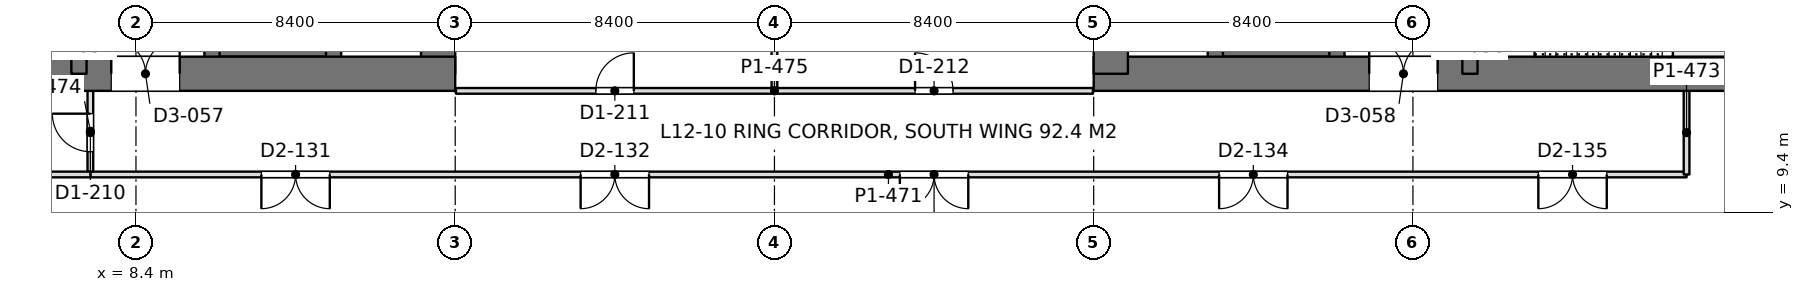
"""IFC4 building model, lengths in metres.
Left out: names, types, materials, properties, quantities, classifications, styles, units other than length and angle.
Written with IfcOpenShell. Run it as: python <this file> out.ifc"""

import sys

from ifc_helpers import new_model, si_unit, direction, frame, frame_2d, origin, place, context, subcontext, project, spatial, rectangle, extrude, element, fill, save


model = new_model("IFC4")
c1 = context("Model", 3, precision=1e-05, world=origin(), true_north=direction((0.0, 1.0)))
c2 = subcontext(c1, "Body", "Model", "MODEL_VIEW")
j1 = project(units=[si_unit("LENGTHUNIT", "METRE"), si_unit("PLANEANGLEUNIT", "RADIAN")], contexts=[c1])
p1 = place(None, origin())
s1 = spatial("IfcSite", under=j1, at=p1, CompositionType="ELEMENT")
p2 = place(p1, origin())
s2 = spatial("IfcBuilding", under=s1, at=p2, CompositionType="ELEMENT")
p3 = place(p2, frame((0.0, 0.0, 54.9)))
s3 = spatial("IfcBuildingStorey", under=s2, at=p3, CompositionType="ELEMENT", Elevation=54.9)
p4 = place(p3, frame((-1.2, 13.05, 0.0), z_axis=(0.0, 0.0, 1.0), x_axis=(1.0, 0.0, 0.0)))
e1 = element("IfcWall", 1, at=p4, inside=s3, PredefinedType="SHEAR", context=c2, shape_type="SweptSolid", body=[
    extrude(rectangle(XDim=18.0, YDim=0.9, at=frame_2d((9.0, 0.0))), origin(), (0.0, 0.0, 1.0), 4.5),
])
p5 = place(p4, frame((8.95, 0.0, 0.0)))
e2 = element("IfcOpeningElement", 2, at=p5, cuts=e1, PredefinedType="OPENING", context=c2, shape_type="SweptSolid", body=[
    extrude(rectangle(XDim=1.8, YDim=2.4, at=frame_2d((0.9, 1.2))), frame((0.0, 0.46, 0.0), z_axis=(0.0, -1.0, 0.0), x_axis=(1.0, 0.0, 0.0)), (0.0, 0.0, 1.0), 0.92),
])
p6 = place(p3, frame((16.35, 13.05, 0.0), z_axis=(0.0, 0.0, 1.0), x_axis=(0.0, 1.0, 0.0)))
e3 = element("IfcWall", 3, at=p6, inside=s3, PredefinedType="SHEAR", context=c2, shape_type="SweptSolid", body=[
    extrude(rectangle(XDim=24.3, YDim=0.9, at=frame_2d((12.15, 0.0))), origin(), (0.0, 0.0, 1.0), 4.5),
])
p7 = place(p3, frame((6.9, 13.05, 0.0), z_axis=(0.0, 0.0, 1.0), x_axis=(0.0, 1.0, 0.0)))
e4 = element("IfcWall", 4, at=p7, inside=s3, PredefinedType="SHEAR", context=c2, shape_type="SweptSolid", body=[
    extrude(rectangle(XDim=24.3, YDim=0.4, at=frame_2d((12.15, 0.0))), origin(), (0.0, 0.0, 1.0), 4.5),
])
p8 = place(p7, frame((1.3, 0.0, 0.0)))
e5 = element("IfcOpeningElement", 5, at=p8, cuts=e4, PredefinedType="OPENING", context=c2, shape_type="SweptSolid", body=[
    extrude(rectangle(XDim=1.0, YDim=2.2, at=frame_2d((0.5, 1.1))), frame((0.0, 0.21, 0.0), z_axis=(0.0, -1.0, 0.0), x_axis=(1.0, 0.0, 0.0)), (0.0, 0.0, 1.0), 0.42),
])
p9 = place(p7, frame((22.0, 0.0, 0.0)))
e6 = element("IfcOpeningElement", 6, at=p9, cuts=e4, PredefinedType="OPENING", context=c2, shape_type="SweptSolid", body=[
    extrude(rectangle(XDim=1.0, YDim=2.2, at=frame_2d((0.5, 1.1))), frame((0.0, 0.21, 0.0), z_axis=(0.0, -1.0, 0.0), x_axis=(1.0, 0.0, 0.0)), (0.0, 0.0, 1.0), 0.42),
])
p10 = place(p7, frame((5.55, 0.0, 0.0)))
e7 = element("IfcOpeningElement", 7, at=p10, cuts=e4, PredefinedType="OPENING", context=c2, shape_type="SweptSolid", body=[
    extrude(rectangle(XDim=1.0, YDim=2.2, at=frame_2d((0.5, 1.1))), frame((0.0, 0.21, 0.0), z_axis=(0.0, -1.0, 0.0), x_axis=(1.0, 0.0, 0.0)), (0.0, 0.0, 1.0), 0.42),
])
p11 = place(p7, frame((9.55, 0.0, 0.0)))
e8 = element("IfcOpeningElement", 8, at=p11, cuts=e4, PredefinedType="OPENING", context=c2, shape_type="SweptSolid", body=[
    extrude(rectangle(XDim=1.0, YDim=2.2, at=frame_2d((0.5, 1.1))), frame((0.0, 0.21, 0.0), z_axis=(0.0, -1.0, 0.0), x_axis=(1.0, 0.0, 0.0)), (0.0, 0.0, 1.0), 0.42),
])
p12 = place(p7, frame((12.8, 0.0, 0.0)))
e9 = element("IfcOpeningElement", 9, at=p12, cuts=e4, PredefinedType="OPENING", context=c2, shape_type="SweptSolid", body=[
    extrude(rectangle(XDim=1.1, YDim=2.2, at=frame_2d((0.55, 1.1))), frame((0.0, 0.21, 0.0), z_axis=(0.0, -1.0, 0.0), x_axis=(1.0, 0.0, 0.0)), (0.0, 0.0, 1.0), 0.42),
])
p13 = place(p7, frame((15.538, 0.0, 0.0)))
e10 = element("IfcOpeningElement", 10, at=p13, cuts=e4, PredefinedType="OPENING", context=c2, shape_type="SweptSolid", body=[
    extrude(rectangle(XDim=1.1, YDim=2.2, at=frame_2d((0.55, 1.1))), frame((0.0, 0.21, 0.0), z_axis=(0.0, -1.0, 0.0), x_axis=(1.0, 0.0, 0.0)), (0.0, 0.0, 1.0), 0.42),
])
p14 = place(p7, frame((18.262, 0.0, 0.0)))
e11 = element("IfcOpeningElement", 11, at=p14, cuts=e4, PredefinedType="OPENING", context=c2, shape_type="SweptSolid", body=[
    extrude(rectangle(XDim=1.1, YDim=2.2, at=frame_2d((0.55, 1.1))), frame((0.0, 0.21, 0.0), z_axis=(0.0, -1.0, 0.0), x_axis=(1.0, 0.0, 0.0)), (0.0, 0.0, 1.0), 0.42),
])
p15 = place(p3, frame((10.4, 13.05, 0.0), z_axis=(0.0, 0.0, 1.0), x_axis=(0.0, 1.0, 0.0)))
e12 = element("IfcWall", 12, at=p15, inside=s3, PredefinedType="SHEAR", context=c2, shape_type="SweptSolid", body=[
    extrude(rectangle(XDim=24.3, YDim=0.4, at=frame_2d((12.15, 0.0))), origin(), (0.0, 0.0, 1.0), 4.5),
])
p16 = place(p15, frame((1.5, 0.0, 0.0)))
e13 = element("IfcOpeningElement", 13, at=p16, cuts=e12, PredefinedType="OPENING", context=c2, shape_type="SweptSolid", body=[
    extrude(rectangle(XDim=1.1, YDim=2.2, at=frame_2d((0.55, 1.1))), frame((0.0, 0.21, 0.0), z_axis=(0.0, -1.0, 0.0), x_axis=(1.0, 0.0, 0.0)), (0.0, 0.0, 1.0), 0.42),
])
p17 = place(p15, frame((4.35, 0.0, 0.0)))
e14 = element("IfcOpeningElement", 14, at=p17, cuts=e12, PredefinedType="OPENING", context=c2, shape_type="SweptSolid", body=[
    extrude(rectangle(XDim=1.1, YDim=2.2, at=frame_2d((0.55, 1.1))), frame((0.0, 0.21, 0.0), z_axis=(0.0, -1.0, 0.0), x_axis=(1.0, 0.0, 0.0)), (0.0, 0.0, 1.0), 0.42),
])
p18 = place(p15, frame((7.2, 0.0, 0.0)))
e15 = element("IfcOpeningElement", 15, at=p18, cuts=e12, PredefinedType="OPENING", context=c2, shape_type="SweptSolid", body=[
    extrude(rectangle(XDim=1.1, YDim=2.2, at=frame_2d((0.55, 1.1))), frame((0.0, 0.21, 0.0), z_axis=(0.0, -1.0, 0.0), x_axis=(1.0, 0.0, 0.0)), (0.0, 0.0, 1.0), 0.42),
])
p19 = place(p15, frame((21.45, 0.0, 0.0)))
e16 = element("IfcOpeningElement", 16, at=p19, cuts=e12, PredefinedType="OPENING", context=c2, shape_type="SweptSolid", body=[
    extrude(rectangle(XDim=1.1, YDim=2.2, at=frame_2d((0.55, 1.1))), frame((0.0, 0.21, 0.0), z_axis=(0.0, -1.0, 0.0), x_axis=(1.0, 0.0, 0.0)), (0.0, 0.0, 1.0), 0.42),
])
p20 = place(p3, frame((13.6, 13.05, 0.0), z_axis=(0.0, 0.0, 1.0), x_axis=(0.0, 1.0, 0.0)))
e17 = element("IfcWall", 17, at=p20, inside=s3, PredefinedType="SHEAR", context=c2, shape_type="SweptSolid", body=[
    extrude(rectangle(XDim=24.3, YDim=0.4, at=frame_2d((12.15, 0.0))), origin(), (0.0, 0.0, 1.0), 4.5),
])
p21 = place(p3, frame((10.4, 13.65, 0.0), z_axis=(0.0, 0.0, 1.0), x_axis=(1.0, 0.0, 0.0)))
e18 = element("IfcWall", 18, at=p21, inside=s3, PredefinedType="SHEAR", context=c2, shape_type="SweptSolid", body=[
    extrude(rectangle(XDim=3.2, YDim=0.3, at=frame_2d((1.6, 0.0))), origin(), (0.0, 0.0, 1.0), 4.5),
])
p22 = place(p3, frame((33.6, 13.05, 0.0), z_axis=(0.0, 0.0, 1.0), x_axis=(1.0, 0.0, 0.0)))
e19 = element("IfcWall", 19, at=p22, inside=s3, PredefinedType="SHEAR", context=c2, shape_type="SweptSolid", body=[
    extrude(rectangle(XDim=18.0, YDim=0.9, at=frame_2d((9.0, 0.0))), origin(), (0.0, 0.0, 1.0), 4.5),
])
p23 = place(p22, frame((7.25, 0.0, 0.0)))
e20 = element("IfcOpeningElement", 20, at=p23, cuts=e19, PredefinedType="OPENING", context=c2, shape_type="SweptSolid", body=[
    extrude(rectangle(XDim=1.8, YDim=2.4, at=frame_2d((0.9, 1.2))), frame((0.0, 0.46, 0.0), z_axis=(0.0, -1.0, 0.0), x_axis=(1.0, 0.0, 0.0)), (0.0, 0.0, 1.0), 0.92),
])
p24 = place(p3, frame((34.05, 13.05, 0.0), z_axis=(0.0, 0.0, 1.0), x_axis=(0.0, 1.0, 0.0)))
e21 = element("IfcWall", 21, at=p24, inside=s3, PredefinedType="SHEAR", context=c2, shape_type="SweptSolid", body=[
    extrude(rectangle(XDim=24.3, YDim=0.9, at=frame_2d((12.15, 0.0))), origin(), (0.0, 0.0, 1.0), 4.5),
])
p25 = place(p3, frame((43.5, 13.05, 0.0), z_axis=(0.0, 0.0, 1.0), x_axis=(0.0, 1.0, 0.0)))
e22 = element("IfcWall", 22, at=p25, inside=s3, PredefinedType="SHEAR", context=c2, shape_type="SweptSolid", body=[
    extrude(rectangle(XDim=24.3, YDim=0.4, at=frame_2d((12.15, 0.0))), origin(), (0.0, 0.0, 1.0), 4.5),
])
p26 = place(p25, frame((1.3, 0.0, 0.0)))
e23 = element("IfcOpeningElement", 23, at=p26, cuts=e22, PredefinedType="OPENING", context=c2, shape_type="SweptSolid", body=[
    extrude(rectangle(XDim=1.0, YDim=2.2, at=frame_2d((0.5, 1.1))), frame((0.0, 0.21, 0.0), z_axis=(0.0, -1.0, 0.0), x_axis=(1.0, 0.0, 0.0)), (0.0, 0.0, 1.0), 0.42),
])
p27 = place(p25, frame((22.0, 0.0, 0.0)))
e24 = element("IfcOpeningElement", 24, at=p27, cuts=e22, PredefinedType="OPENING", context=c2, shape_type="SweptSolid", body=[
    extrude(rectangle(XDim=1.0, YDim=2.2, at=frame_2d((0.5, 1.1))), frame((0.0, 0.21, 0.0), z_axis=(0.0, -1.0, 0.0), x_axis=(1.0, 0.0, 0.0)), (0.0, 0.0, 1.0), 0.42),
])
p28 = place(p25, frame((5.55, 0.0, 0.0)))
e25 = element("IfcOpeningElement", 25, at=p28, cuts=e22, PredefinedType="OPENING", context=c2, shape_type="SweptSolid", body=[
    extrude(rectangle(XDim=1.0, YDim=2.2, at=frame_2d((0.5, 1.1))), frame((0.0, 0.21, 0.0), z_axis=(0.0, -1.0, 0.0), x_axis=(1.0, 0.0, 0.0)), (0.0, 0.0, 1.0), 0.42),
])
p29 = place(p25, frame((9.55, 0.0, 0.0)))
e26 = element("IfcOpeningElement", 26, at=p29, cuts=e22, PredefinedType="OPENING", context=c2, shape_type="SweptSolid", body=[
    extrude(rectangle(XDim=1.0, YDim=2.2, at=frame_2d((0.5, 1.1))), frame((0.0, 0.21, 0.0), z_axis=(0.0, -1.0, 0.0), x_axis=(1.0, 0.0, 0.0)), (0.0, 0.0, 1.0), 0.42),
])
p30 = place(p25, frame((12.8, 0.0, 0.0)))
e27 = element("IfcOpeningElement", 27, at=p30, cuts=e22, PredefinedType="OPENING", context=c2, shape_type="SweptSolid", body=[
    extrude(rectangle(XDim=1.1, YDim=2.2, at=frame_2d((0.55, 1.1))), frame((0.0, 0.21, 0.0), z_axis=(0.0, -1.0, 0.0), x_axis=(1.0, 0.0, 0.0)), (0.0, 0.0, 1.0), 0.42),
])
p31 = place(p25, frame((15.538, 0.0, 0.0)))
e28 = element("IfcOpeningElement", 28, at=p31, cuts=e22, PredefinedType="OPENING", context=c2, shape_type="SweptSolid", body=[
    extrude(rectangle(XDim=1.1, YDim=2.2, at=frame_2d((0.55, 1.1))), frame((0.0, 0.21, 0.0), z_axis=(0.0, -1.0, 0.0), x_axis=(1.0, 0.0, 0.0)), (0.0, 0.0, 1.0), 0.42),
])
p32 = place(p25, frame((18.262, 0.0, 0.0)))
e29 = element("IfcOpeningElement", 29, at=p32, cuts=e22, PredefinedType="OPENING", context=c2, shape_type="SweptSolid", body=[
    extrude(rectangle(XDim=1.1, YDim=2.2, at=frame_2d((0.55, 1.1))), frame((0.0, 0.21, 0.0), z_axis=(0.0, -1.0, 0.0), x_axis=(1.0, 0.0, 0.0)), (0.0, 0.0, 1.0), 0.42),
])
p33 = place(p3, frame((40.0, 13.05, 0.0), z_axis=(0.0, 0.0, 1.0), x_axis=(0.0, 1.0, 0.0)))
e30 = element("IfcWall", 30, at=p33, inside=s3, PredefinedType="SHEAR", context=c2, shape_type="SweptSolid", body=[
    extrude(rectangle(XDim=24.3, YDim=0.4, at=frame_2d((12.15, 0.0))), origin(), (0.0, 0.0, 1.0), 4.5),
])
p34 = place(p33, frame((1.5, 0.0, 0.0)))
e31 = element("IfcOpeningElement", 31, at=p34, cuts=e30, PredefinedType="OPENING", context=c2, shape_type="SweptSolid", body=[
    extrude(rectangle(XDim=1.1, YDim=2.2, at=frame_2d((0.55, 1.1))), frame((0.0, 0.21, 0.0), z_axis=(0.0, -1.0, 0.0), x_axis=(1.0, 0.0, 0.0)), (0.0, 0.0, 1.0), 0.42),
])
p35 = place(p33, frame((4.35, 0.0, 0.0)))
e32 = element("IfcOpeningElement", 32, at=p35, cuts=e30, PredefinedType="OPENING", context=c2, shape_type="SweptSolid", body=[
    extrude(rectangle(XDim=1.1, YDim=2.2, at=frame_2d((0.55, 1.1))), frame((0.0, 0.21, 0.0), z_axis=(0.0, -1.0, 0.0), x_axis=(1.0, 0.0, 0.0)), (0.0, 0.0, 1.0), 0.42),
])
p36 = place(p33, frame((7.2, 0.0, 0.0)))
e33 = element("IfcOpeningElement", 33, at=p36, cuts=e30, PredefinedType="OPENING", context=c2, shape_type="SweptSolid", body=[
    extrude(rectangle(XDim=1.1, YDim=2.2, at=frame_2d((0.55, 1.1))), frame((0.0, 0.21, 0.0), z_axis=(0.0, -1.0, 0.0), x_axis=(1.0, 0.0, 0.0)), (0.0, 0.0, 1.0), 0.42),
])
p37 = place(p33, frame((21.45, 0.0, 0.0)))
e34 = element("IfcOpeningElement", 34, at=p37, cuts=e30, PredefinedType="OPENING", context=c2, shape_type="SweptSolid", body=[
    extrude(rectangle(XDim=1.1, YDim=2.2, at=frame_2d((0.55, 1.1))), frame((0.0, 0.21, 0.0), z_axis=(0.0, -1.0, 0.0), x_axis=(1.0, 0.0, 0.0)), (0.0, 0.0, 1.0), 0.42),
])
p38 = place(p3, frame((36.8, 13.05, 0.0), z_axis=(0.0, 0.0, 1.0), x_axis=(0.0, 1.0, 0.0)))
e35 = element("IfcWall", 35, at=p38, inside=s3, PredefinedType="SHEAR", context=c2, shape_type="SweptSolid", body=[
    extrude(rectangle(XDim=24.3, YDim=0.4, at=frame_2d((12.15, 0.0))), origin(), (0.0, 0.0, 1.0), 4.5),
])
p39 = place(p3, frame((40.0, 13.65, 0.0), z_axis=(0.0, 0.0, 1.0), x_axis=(-1.0, 0.0, 0.0)))
e36 = element("IfcWall", 36, at=p39, inside=s3, PredefinedType="SHEAR", context=c2, shape_type="SweptSolid", body=[
    extrude(rectangle(XDim=3.2, YDim=0.3, at=frame_2d((1.6, 0.0))), origin(), (0.0, 0.0, 1.0), 4.5),
])
p40 = place(p3, frame((7.198, 10.4, 0.0), z_axis=(0.0, 0.0, 1.0), x_axis=(1.0, 0.0, 0.0)))
e37 = element("IfcWall", 37, at=p40, inside=s3, PredefinedType="PARTITIONING", context=c2, shape_type="SweptSolid", body=[
    extrude(rectangle(XDim=42.002, YDim=0.15, at=frame_2d((21.001, 0.0))), origin(), (0.0, 0.0, 1.0), 3.74),
])
p41 = place(p40, frame((4.502, 0.0, 0.0)))
e38 = element("IfcOpeningElement", 38, at=p41, cuts=e37, PredefinedType="OPENING", context=c2, shape_type="SweptSolid", body=[
    extrude(rectangle(XDim=1.8, YDim=2.2, at=frame_2d((0.9, 1.1))), frame((0.0, 0.085, 0.0), z_axis=(0.0, -1.0, 0.0), x_axis=(1.0, 0.0, 0.0)), (0.0, 0.0, 1.0), 0.17),
])
p42 = place(p40, frame((12.902, 0.0, 0.0)))
e39 = element("IfcOpeningElement", 39, at=p42, cuts=e37, PredefinedType="OPENING", context=c2, shape_type="SweptSolid", body=[
    extrude(rectangle(XDim=1.8, YDim=2.2, at=frame_2d((0.9, 1.1))), frame((0.0, 0.085, 0.0), z_axis=(0.0, -1.0, 0.0), x_axis=(1.0, 0.0, 0.0)), (0.0, 0.0, 1.0), 0.17),
])
p43 = place(p40, frame((21.302, 0.0, 0.0)))
e40 = element("IfcOpeningElement", 40, at=p43, cuts=e37, PredefinedType="OPENING", context=c2, shape_type="SweptSolid", body=[
    extrude(rectangle(XDim=1.8, YDim=2.2, at=frame_2d((0.9, 1.1))), frame((0.0, 0.085, 0.0), z_axis=(0.0, -1.0, 0.0), x_axis=(1.0, 0.0, 0.0)), (0.0, 0.0, 1.0), 0.17),
])
p44 = place(p40, frame((29.702, 0.0, 0.0)))
e41 = element("IfcOpeningElement", 41, at=p44, cuts=e37, PredefinedType="OPENING", context=c2, shape_type="SweptSolid", body=[
    extrude(rectangle(XDim=1.8, YDim=2.2, at=frame_2d((0.9, 1.1))), frame((0.0, 0.085, 0.0), z_axis=(0.0, -1.0, 0.0), x_axis=(1.0, 0.0, 0.0)), (0.0, 0.0, 1.0), 0.17),
])
p45 = place(p40, frame((38.102, 0.0, 0.0)))
e42 = element("IfcOpeningElement", 42, at=p45, cuts=e37, PredefinedType="OPENING", context=c2, shape_type="SweptSolid", body=[
    extrude(rectangle(XDim=1.8, YDim=2.2, at=frame_2d((0.9, 1.1))), frame((0.0, 0.085, 0.0), z_axis=(0.0, -1.0, 0.0), x_axis=(1.0, 0.0, 0.0)), (0.0, 0.0, 1.0), 0.17),
])
p46 = place(p3, frame((7.2, 10.474, 0.0), z_axis=(0.0, 0.0, 1.0), x_axis=(0.0, 1.0, 0.0)))
e43 = element("IfcWall", 43, at=p46, inside=s3, PredefinedType="PARTITIONING", context=c2, shape_type="SweptSolid", body=[
    extrude(rectangle(XDim=2.128, YDim=0.15, at=frame_2d((1.064, 0.0))), origin(), (0.0, 0.0, 1.0), 4.34),
])
p47 = place(p46, frame((0.526, 0.0, 0.0)))
e44 = element("IfcOpeningElement", 44, at=p47, cuts=e43, PredefinedType="OPENING", context=c2, shape_type="SweptSolid", body=[
    extrude(rectangle(XDim=1.0, YDim=2.2, at=frame_2d((0.5, 1.1))), frame((0.0, 0.085, 0.0), z_axis=(0.0, -1.0, 0.0), x_axis=(1.0, 0.0, 0.0)), (0.0, 0.0, 1.0), 0.17),
])
p48 = place(p3, frame((49.2, 10.4, 0.0), z_axis=(0.0, 0.0, 1.0), x_axis=(0.0, 1.0, 0.0)))
e45 = element("IfcWall", 45, at=p48, inside=s3, PredefinedType="PARTITIONING", context=c2, shape_type="SweptSolid", body=[
    extrude(rectangle(XDim=2.202, YDim=0.15, at=frame_2d((1.101, 0.0))), origin(), (0.0, 0.0, 1.0), 4.34),
])
p49 = place(p3, frame((1.2, 10.4, 0.0), z_axis=(0.0, 0.0, 1.0), x_axis=(1.0, 0.0, 0.0)))
e46 = element("IfcWall", 46, at=p49, inside=s3, PredefinedType="PARTITIONING", context=c2, shape_type="SweptSolid", body=[
    extrude(rectangle(XDim=6.002, YDim=0.15, at=frame_2d((3.001, 0.0))), origin(), (0.0, 0.0, 1.0), 4.34),
])
p50 = place(p3, frame((25.2, 12.674, 0.0), z_axis=(0.0, 0.0, 1.0), x_axis=(0.0, 1.0, 0.0)))
e47 = element("IfcWall", 47, at=p50, inside=s3, PredefinedType="PARTITIONING", context=c2, shape_type="SweptSolid", body=[
    extrude(rectangle(XDim=3.527, YDim=0.15, at=frame_2d((1.763, 0.0))), origin(), (0.0, 0.0, 1.0), 3.74),
])
p51 = place(p3, frame((16.82, 12.6, 0.0), z_axis=(0.0, 0.0, 1.0), x_axis=(1.0, 0.0, 0.0)))
e48 = element("IfcWall", 48, at=p51, inside=s3, PredefinedType="PARTITIONING", context=c2, shape_type="SweptSolid", body=[
    extrude(rectangle(XDim=16.76, YDim=0.15, at=frame_2d((8.38, 0.0))), origin(), (0.0, 0.0, 1.0), 3.74),
])
p52 = place(p51, frame((3.68, 0.0, 0.0)))
e49 = element("IfcOpeningElement", 49, at=p52, cuts=e48, PredefinedType="OPENING", context=c2, shape_type="SweptSolid", body=[
    extrude(rectangle(XDim=1.0, YDim=2.2, at=frame_2d((0.5, 1.1))), frame((0.0, 0.085, 0.0), z_axis=(0.0, -1.0, 0.0), x_axis=(1.0, 0.0, 0.0)), (0.0, 0.0, 1.0), 0.17),
])
p53 = place(p51, frame((12.08, 0.0, 0.0)))
e50 = element("IfcOpeningElement", 50, at=p53, cuts=e48, PredefinedType="OPENING", context=c2, shape_type="SweptSolid", body=[
    extrude(rectangle(XDim=1.0, YDim=2.2, at=frame_2d((0.5, 1.1))), frame((0.0, 0.085, 0.0), z_axis=(0.0, -1.0, 0.0), x_axis=(1.0, 0.0, 0.0)), (0.0, 0.0, 1.0), 0.17),
])
p54 = place(p5, origin())
e51 = element("IfcDoor", 51, at=p54, inside=s3, OperationType="DOUBLE_DOOR_SINGLE_SWING", PredefinedType="DOOR", context=c2, shape_type="SweptSolid", body=[
    extrude(rectangle(XDim=1.8, YDim=2.4, at=frame_2d((0.9, 1.2))), frame((0.0, 0.025, 0.0), z_axis=(0.0, -1.0, 0.0), x_axis=(1.0, 0.0, 0.0)), (0.0, 0.0, 1.0), 0.05),
])
fill(e2, e51)
p55 = place(p23, origin())
e52 = element("IfcDoor", 52, at=p55, inside=s3, OperationType="DOUBLE_DOOR_SINGLE_SWING", PredefinedType="DOOR", context=c2, shape_type="SweptSolid", body=[
    extrude(rectangle(XDim=1.8, YDim=2.4, at=frame_2d((0.9, 1.2))), frame((0.0, 0.025, 0.0), z_axis=(0.0, -1.0, 0.0), x_axis=(1.0, 0.0, 0.0)), (0.0, 0.0, 1.0), 0.05),
])
fill(e20, e52)
p56 = place(p41, frame((1.8, 0.0, 0.0), z_axis=(0.0, 0.0, 1.0), x_axis=(-1.0, 0.0, 0.0)))
e53 = element("IfcDoor", 53, at=p56, inside=s3, OperationType="DOUBLE_DOOR_SINGLE_SWING", PredefinedType="DOOR", context=c2, shape_type="SweptSolid", body=[
    extrude(rectangle(XDim=1.8, YDim=2.2, at=frame_2d((0.9, 1.1))), frame((0.0, 0.025, 0.0), z_axis=(0.0, -1.0, 0.0), x_axis=(1.0, 0.0, 0.0)), (0.0, 0.0, 1.0), 0.05),
])
fill(e38, e53)
p57 = place(p42, frame((1.8, 0.0, 0.0), z_axis=(0.0, 0.0, 1.0), x_axis=(-1.0, 0.0, 0.0)))
e54 = element("IfcDoor", 54, at=p57, inside=s3, OperationType="DOUBLE_DOOR_SINGLE_SWING", PredefinedType="DOOR", context=c2, shape_type="SweptSolid", body=[
    extrude(rectangle(XDim=1.8, YDim=2.2, at=frame_2d((0.9, 1.1))), frame((0.0, 0.025, 0.0), z_axis=(0.0, -1.0, 0.0), x_axis=(1.0, 0.0, 0.0)), (0.0, 0.0, 1.0), 0.05),
])
fill(e39, e54)
p58 = place(p43, frame((1.8, 0.0, 0.0), z_axis=(0.0, 0.0, 1.0), x_axis=(-1.0, 0.0, 0.0)))
e55 = element("IfcDoor", 55, at=p58, inside=s3, OperationType="DOUBLE_DOOR_SINGLE_SWING", PredefinedType="DOOR", context=c2, shape_type="SweptSolid", body=[
    extrude(rectangle(XDim=1.8, YDim=2.2, at=frame_2d((0.9, 1.1))), frame((0.0, 0.025, 0.0), z_axis=(0.0, -1.0, 0.0), x_axis=(1.0, 0.0, 0.0)), (0.0, 0.0, 1.0), 0.05),
])
fill(e40, e55)
p59 = place(p44, frame((1.8, 0.0, 0.0), z_axis=(0.0, 0.0, 1.0), x_axis=(-1.0, 0.0, 0.0)))
e56 = element("IfcDoor", 56, at=p59, inside=s3, OperationType="DOUBLE_DOOR_SINGLE_SWING", PredefinedType="DOOR", context=c2, shape_type="SweptSolid", body=[
    extrude(rectangle(XDim=1.8, YDim=2.2, at=frame_2d((0.9, 1.1))), frame((0.0, 0.025, 0.0), z_axis=(0.0, -1.0, 0.0), x_axis=(1.0, 0.0, 0.0)), (0.0, 0.0, 1.0), 0.05),
])
fill(e41, e56)
p60 = place(p45, frame((1.8, 0.0, 0.0), z_axis=(0.0, 0.0, 1.0), x_axis=(-1.0, 0.0, 0.0)))
e57 = element("IfcDoor", 57, at=p60, inside=s3, OperationType="DOUBLE_DOOR_SINGLE_SWING", PredefinedType="DOOR", context=c2, shape_type="SweptSolid", body=[
    extrude(rectangle(XDim=1.8, YDim=2.2, at=frame_2d((0.9, 1.1))), frame((0.0, 0.025, 0.0), z_axis=(0.0, -1.0, 0.0), x_axis=(1.0, 0.0, 0.0)), (0.0, 0.0, 1.0), 0.05),
])
fill(e42, e57)
p61 = place(p47, origin())
e58 = element("IfcDoor", 58, at=p61, inside=s3, OperationType="SINGLE_SWING_RIGHT", PredefinedType="DOOR", context=c2, shape_type="SweptSolid", body=[
    extrude(rectangle(XDim=1.0, YDim=2.2, at=frame_2d((0.5, 1.1))), frame((0.0, 0.025, 0.0), z_axis=(0.0, -1.0, 0.0), x_axis=(1.0, 0.0, 0.0)), (0.0, 0.0, 1.0), 0.05),
])
fill(e44, e58)
p62 = place(p52, origin())
e59 = element("IfcDoor", 59, at=p62, inside=s3, OperationType="SINGLE_SWING_RIGHT", PredefinedType="DOOR", context=c2, shape_type="SweptSolid", body=[
    extrude(rectangle(XDim=1.0, YDim=2.2, at=frame_2d((0.5, 1.1))), frame((0.0, 0.025, 0.0), z_axis=(0.0, -1.0, 0.0), x_axis=(1.0, 0.0, 0.0)), (0.0, 0.0, 1.0), 0.05),
])
fill(e49, e59)
p63 = place(p53, origin())
e60 = element("IfcDoor", 60, at=p63, inside=s3, OperationType="SINGLE_SWING_LEFT", PredefinedType="DOOR", context=c2, shape_type="SweptSolid", body=[
    extrude(rectangle(XDim=1.0, YDim=2.2, at=frame_2d((0.5, 1.1))), frame((0.0, 0.025, 0.0), z_axis=(0.0, -1.0, 0.0), x_axis=(1.0, 0.0, 0.0)), (0.0, 0.0, 1.0), 0.05),
])
fill(e50, e60)
save(model, sys.argv[1])
